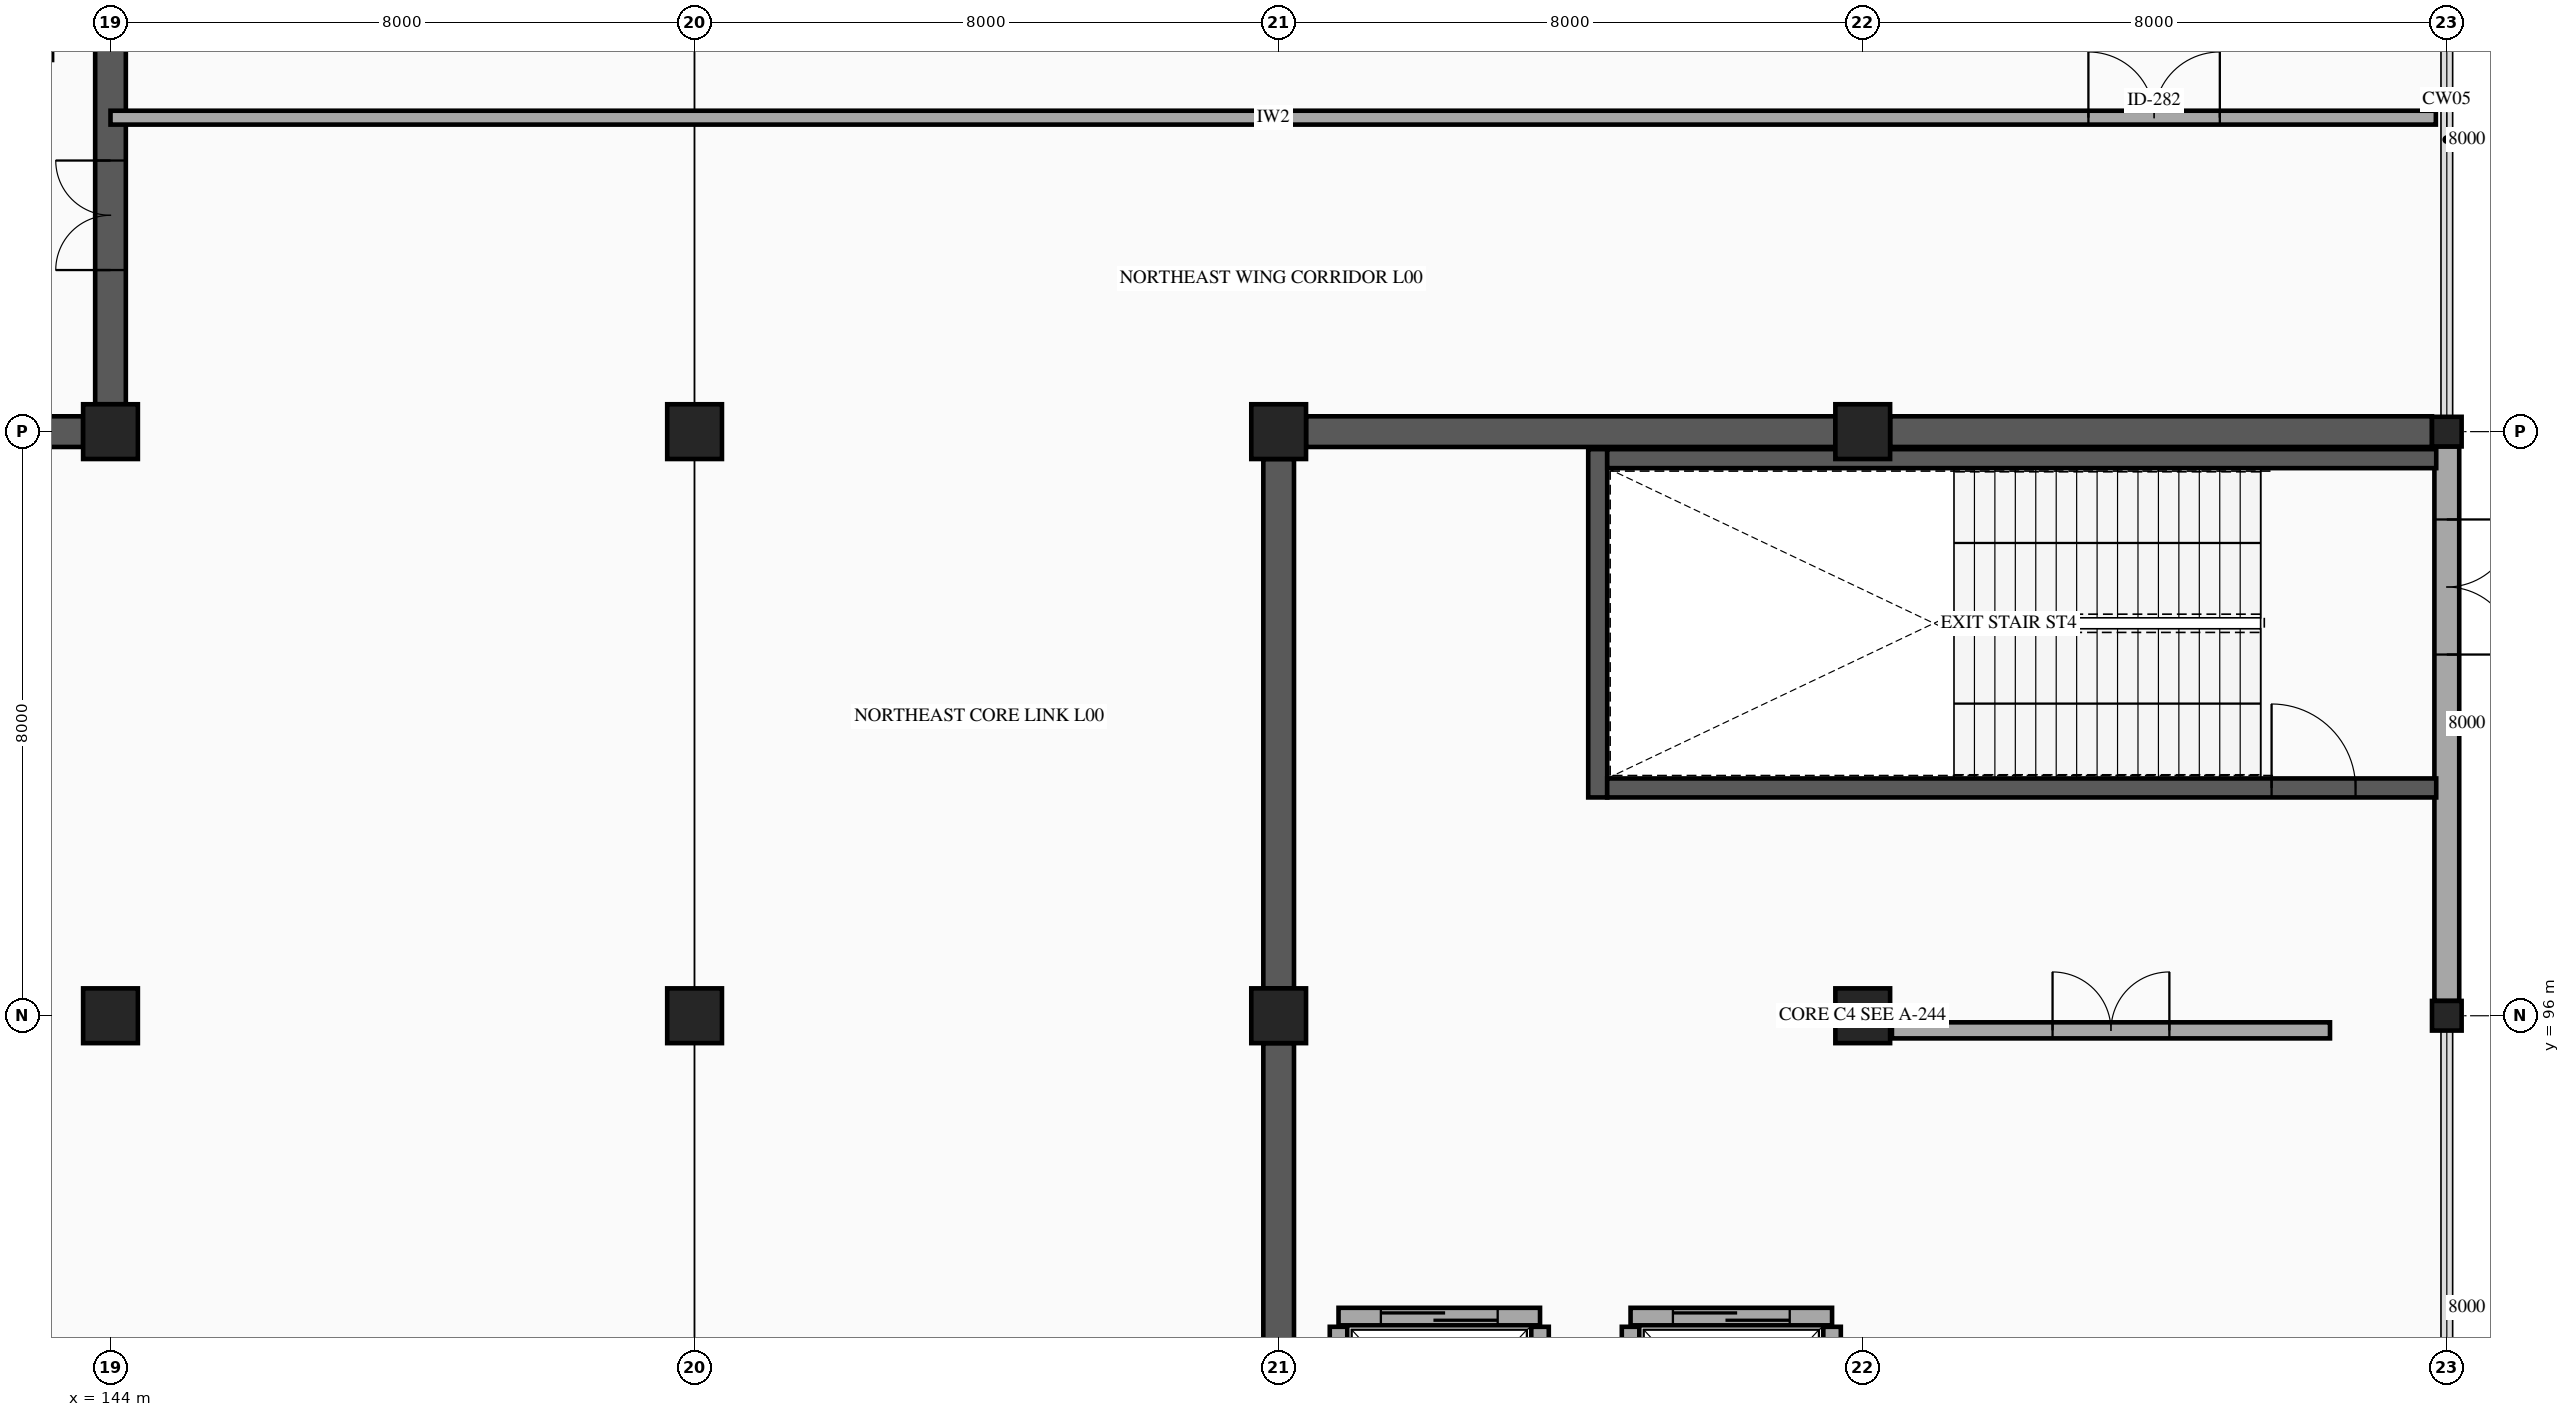
"""IFC4 building model, lengths in metres.
Left out: names, types, materials, properties, quantities, classifications, styles, units other than length and angle.
Written with IfcOpenShell. Run it as: python <this file> out.ifc"""

import sys

from ifc_helpers import new_model, si_unit, direction, frame, frame_2d, origin, origin_2d, place, context, subcontext, project, spatial, rectangle, hollow_rectangle, extrude, element, fill, save


model = new_model("IFC4")
c1 = context("Model", 3, precision=1e-05, world=origin(), true_north=direction((0.0, 1.0)))
c2 = subcontext(c1, "Body", "Model", "MODEL_VIEW")
j1 = project(units=[si_unit("LENGTHUNIT", "METRE"), si_unit("PLANEANGLEUNIT", "RADIAN")], contexts=[c1])
p1 = place(None, origin())
s1 = spatial("IfcSite", under=j1, at=p1, CompositionType="ELEMENT")
p2 = place(p1, origin())
s2 = spatial("IfcBuilding", under=s1, at=p2, CompositionType="ELEMENT")
p3 = place(p2, origin())
s3 = spatial("IfcBuildingStorey", under=s2, at=p3, CompositionType="ELEMENT", Elevation=0.0)
for number, where, z_axis, x_axis in (
    (1, (144.0, 96.0, 0.0), (0.0, 0.0, 1.0), (1.0, 0.0, 0.0)),
    (2, (144.0, 104.0, 0.0), (0.0, 0.0, 1.0), (1.0, 0.0, 0.0)),
    (3, (152.0, 96.0, 0.0), (0.0, 0.0, 1.0), (1.0, 0.0, 0.0)),
    (4, (152.0, 104.0, 0.0), (0.0, 0.0, 1.0), (1.0, 0.0, 0.0)),
    (5, (160.0, 96.0, 0.0), (0.0, 0.0, 1.0), (1.0, 0.0, 0.0)),
    (6, (160.0, 104.0, 0.0), (0.0, 0.0, 1.0), (1.0, 0.0, 0.0)),
    (7, (168.0, 96.0, 0.0), (0.0, 0.0, 1.0), (1.0, 0.0, 0.0)),
    (8, (168.0, 104.0, 0.0), (0.0, 0.0, 1.0), (1.0, 0.0, 0.0)),
):
    element("IfcColumn", number, at=place(p3, frame(where, z_axis=z_axis, x_axis=x_axis)), inside=s3, PredefinedType="COLUMN", context=c2, shape_type="SweptSolid", body=[
        extrude(rectangle(XDim=0.75, YDim=0.75, at=origin_2d()), origin(), (0.0, 0.0, 1.0), 5.6),
    ])
for number, where, z_axis, x_axis in (
    (9, (176.0, 96.0, 0.0), (0.0, 0.0, 1.0), (1.0, 0.0, 0.0)),
    (10, (176.0, 104.0, 0.0), (0.0, 0.0, 1.0), (1.0, 0.0, 0.0)),
):
    element("IfcColumn", number, at=place(p3, frame(where, z_axis=z_axis, x_axis=x_axis)), inside=s3, PredefinedType="COLUMN", context=c2, shape_type="SweptSolid", body=[
        extrude(hollow_rectangle(XDim=0.406, YDim=0.406, WallThickness=0.015, InnerFilletRadius=0.015, OuterFilletRadius=0.029, at=origin_2d()), origin(), (0.0, 0.0, 1.0), 5.6),
    ])
p4 = place(p3, frame((176.0, 103.797, 0.0), z_axis=(0.0, 0.0, 1.0), x_axis=(0.0, -1.0, 0.0)))
e11 = element("IfcWall", 11, at=p4, inside=s3, PredefinedType="STANDARD", context=c2, shape_type="SweptSolid", body=[
    extrude(rectangle(XDim=7.594, YDim=0.34, at=frame_2d((3.797, 0.0))), origin(), (0.0, 0.0, 1.0), 4.58),
])
p5 = place(p4, frame((1.0, 0.0, 0.0)))
e12 = element("IfcOpeningElement", 12, at=p5, cuts=e11, PredefinedType="OPENING", context=c2, shape_type="SweptSolid", body=[
    extrude(rectangle(XDim=1.85, YDim=2.2, at=frame_2d((0.925, 1.1))), frame((0.0, 0.18, 0.0), z_axis=(0.0, -1.0, 0.0), x_axis=(1.0, 0.0, 0.0)), (0.0, 0.0, 1.0), 0.36),
])
p6 = place(p3, frame((136.375, 104.0, 0.0), z_axis=(0.0, 0.0, 1.0), x_axis=(1.0, 0.0, 0.0)))
e13 = element("IfcWall", 13, at=p6, inside=s3, PredefinedType="SHEAR", context=c2, shape_type="SweptSolid", body=[
    extrude(rectangle(XDim=7.25, YDim=0.42, at=frame_2d((3.625, 0.0))), origin(), (0.0, 0.0, 1.0), 5.38),
])
p7 = place(p6, frame((2.875, 0.0, 0.0)))
e14 = element("IfcOpeningElement", 14, at=p7, cuts=e13, PredefinedType="OPENING", context=c2, shape_type="SweptSolid", body=[
    extrude(rectangle(XDim=1.5, YDim=2.15, at=frame_2d((0.75, 1.075))), frame((0.0, 0.22, 0.0), z_axis=(0.0, -1.0, 0.0), x_axis=(1.0, 0.0, 0.0)), (0.0, 0.0, 1.0), 0.44),
])
p8 = place(p3, frame((144.0, 104.375, 0.0), z_axis=(0.0, 0.0, 1.0), x_axis=(0.0, 1.0, 0.0)))
e15 = element("IfcWall", 15, at=p8, inside=s3, PredefinedType="SHEAR", context=c2, shape_type="SweptSolid", body=[
    extrude(rectangle(XDim=7.25, YDim=0.42, at=frame_2d((3.625, 0.0))), origin(), (0.0, 0.0, 1.0), 5.38),
])
p9 = place(p8, frame((1.838, 0.0, 0.0)))
e16 = element("IfcOpeningElement", 16, at=p9, cuts=e15, PredefinedType="OPENING", context=c2, shape_type="SweptSolid", body=[
    extrude(rectangle(XDim=1.5, YDim=2.15, at=frame_2d((0.75, 1.075))), frame((0.0, 0.22, 0.0), z_axis=(0.0, -1.0, 0.0), x_axis=(1.0, 0.0, 0.0)), (0.0, 0.0, 1.0), 0.44),
])
p10 = place(p3, frame((164.37, 98.99, 0.0), z_axis=(0.0, 0.0, 1.0), x_axis=(0.0, 1.0, 0.0)))
e17 = element("IfcWall", 17, at=p10, inside=s3, PredefinedType="SHEAR", context=c2, shape_type="SweptSolid", body=[
    extrude(rectangle(XDim=4.77, YDim=0.26, at=frame_2d((2.385, 0.0))), origin(), (0.0, 0.0, 1.0), 5.38),
])
p11 = place(p3, frame((164.5, 99.12, 0.0), z_axis=(0.0, 0.0, 1.0), x_axis=(1.0, 0.0, 0.0)))
e18 = element("IfcWall", 18, at=p11, inside=s3, PredefinedType="SHEAR", context=c2, shape_type="SweptSolid", body=[
    extrude(rectangle(XDim=11.355, YDim=0.26, at=frame_2d((5.677, 0.0))), origin(), (0.0, 0.0, 1.0), 5.38),
])
p12 = place(p11, frame((9.1, 0.0, 0.0)))
e19 = element("IfcOpeningElement", 19, at=p12, cuts=e18, PredefinedType="OPENING", context=c2, shape_type="SweptSolid", body=[
    extrude(rectangle(XDim=1.15, YDim=2.15, at=frame_2d((0.575, 1.075))), frame((0.0, 0.14, 0.0), z_axis=(0.0, -1.0, 0.0), x_axis=(1.0, 0.0, 0.0)), (0.0, 0.0, 1.0), 0.28),
])
p13 = place(p3, frame((164.5, 103.63, 0.0), z_axis=(0.0, 0.0, 1.0), x_axis=(1.0, 0.0, 0.0)))
e20 = element("IfcWall", 20, at=p13, inside=s3, PredefinedType="SHEAR", context=c2, shape_type="SweptSolid", body=[
    extrude(rectangle(XDim=11.355, YDim=0.26, at=frame_2d((5.677, 0.0))), origin(), (0.0, 0.0, 1.0), 5.38),
])
p14 = place(p3, frame((160.375, 104.0, 0.0), z_axis=(0.0, 0.0, 1.0), x_axis=(1.0, 0.0, 0.0)))
e21 = element("IfcWall", 21, at=p14, inside=s3, PredefinedType="SHEAR", context=c2, shape_type="SweptSolid", body=[
    extrude(rectangle(XDim=7.25, YDim=0.42, at=frame_2d((3.625, 0.0))), origin(), (0.0, 0.0, 1.0), 5.38),
])
p15 = place(p3, frame((168.375, 104.0, 0.0), z_axis=(0.0, 0.0, 1.0), x_axis=(1.0, 0.0, 0.0)))
e22 = element("IfcWall", 22, at=p15, inside=s3, PredefinedType="SHEAR", context=c2, shape_type="SweptSolid", body=[
    extrude(rectangle(XDim=7.422, YDim=0.42, at=frame_2d((3.711, 0.0))), origin(), (0.0, 0.0, 1.0), 5.38),
])
for number, where, z_axis, x_axis in (
    (23, (160.0, 88.375, 0.0), (0.0, 0.0, 1.0), (0.0, 1.0, 0.0)),
    (24, (160.0, 96.375, 0.0), (0.0, 0.0, 1.0), (0.0, 1.0, 0.0)),
):
    element("IfcWall", number, at=place(p3, frame(where, z_axis=z_axis, x_axis=x_axis)), inside=s3, PredefinedType="SHEAR", context=c2, shape_type="SweptSolid", body=[
        extrude(rectangle(XDim=7.25, YDim=0.42, at=frame_2d((3.625, 0.0))), origin(), (0.0, 0.0, 1.0), 5.38),
    ])
p16 = place(p3, frame((164.82, 91.88, 0.0), z_axis=(0.0, 0.0, 1.0), x_axis=(1.0, 0.0, 0.0)))
e25 = element("IfcWall", 25, at=p16, inside=s3, PredefinedType="PARTITIONING", context=c2, shape_type="SweptSolid", body=[
    extrude(rectangle(XDim=2.76, YDim=0.24, at=frame_2d((1.38, 0.0))), origin(), (0.0, 0.0, 1.0), 5.38),
])
p17 = place(p16, frame((0.58, 0.0, 0.0)))
e26 = element("IfcOpeningElement", 26, at=p17, cuts=e25, PredefinedType="OPENING", context=c2, shape_type="SweptSolid", body=[
    extrude(rectangle(XDim=1.6, YDim=2.3, at=frame_2d((0.8, 1.15))), frame((0.0, 0.13, 0.0), z_axis=(0.0, -1.0, 0.0), x_axis=(1.0, 0.0, 0.0)), (0.0, 0.0, 1.0), 0.26),
])
for number, where, z_axis, x_axis in (
    (27, (164.82, 89.06, 0.0), (0.0, 0.0, 1.0), (0.0, 1.0, 0.0)),
    (28, (167.58, 89.06, 0.0), (0.0, 0.0, 1.0), (0.0, 1.0, 0.0)),
):
    element("IfcWall", number, at=place(p3, frame(where, z_axis=z_axis, x_axis=x_axis)), inside=s3, PredefinedType="PARTITIONING", context=c2, shape_type="SweptSolid", body=[
        extrude(rectangle(XDim=2.68, YDim=0.24, at=frame_2d((1.34, 0.0))), origin(), (0.0, 0.0, 1.0), 5.38),
    ])
p18 = place(p3, frame((160.82, 91.88, 0.0), z_axis=(0.0, 0.0, 1.0), x_axis=(1.0, 0.0, 0.0)))
e29 = element("IfcWall", 29, at=p18, inside=s3, PredefinedType="PARTITIONING", context=c2, shape_type="SweptSolid", body=[
    extrude(rectangle(XDim=2.76, YDim=0.24, at=frame_2d((1.38, 0.0))), origin(), (0.0, 0.0, 1.0), 5.38),
])
p19 = place(p18, frame((0.58, 0.0, 0.0)))
e30 = element("IfcOpeningElement", 30, at=p19, cuts=e29, PredefinedType="OPENING", context=c2, shape_type="SweptSolid", body=[
    extrude(rectangle(XDim=1.6, YDim=2.3, at=frame_2d((0.8, 1.15))), frame((0.0, 0.13, 0.0), z_axis=(0.0, -1.0, 0.0), x_axis=(1.0, 0.0, 0.0)), (0.0, 0.0, 1.0), 0.26),
])
for number, where, z_axis, x_axis in (
    (31, (160.82, 89.06, 0.0), (0.0, 0.0, 1.0), (0.0, 1.0, 0.0)),
    (32, (163.58, 89.06, 0.0), (0.0, 0.0, 1.0), (0.0, 1.0, 0.0)),
):
    element("IfcWall", number, at=place(p3, frame(where, z_axis=z_axis, x_axis=x_axis)), inside=s3, PredefinedType="PARTITIONING", context=c2, shape_type="SweptSolid", body=[
        extrude(rectangle(XDim=2.68, YDim=0.24, at=frame_2d((1.34, 0.0))), origin(), (0.0, 0.0, 1.0), 5.38),
    ])
p20 = place(p3, frame((168.4, 95.8, 0.0), z_axis=(0.0, 0.0, 1.0), x_axis=(1.0, 0.0, 0.0)))
e33 = element("IfcWall", 33, at=p20, inside=s3, PredefinedType="PARTITIONING", context=c2, shape_type="SweptSolid", body=[
    extrude(rectangle(XDim=6.0, YDim=0.22, at=frame_2d((3.0, 0.0))), origin(), (0.0, 0.0, 1.0), 4.58),
])
p21 = place(p20, frame((2.2, 0.0, 0.0)))
e34 = element("IfcOpeningElement", 34, at=p21, cuts=e33, PredefinedType="OPENING", context=c2, shape_type="SweptSolid", body=[
    extrude(rectangle(XDim=1.6, YDim=2.15, at=frame_2d((0.8, 1.075))), frame((0.0, 0.12, 0.0), z_axis=(0.0, -1.0, 0.0), x_axis=(1.0, 0.0, 0.0)), (0.0, 0.0, 1.0), 0.24),
])
p22 = place(p3, frame((144.0, 108.3, 0.0), z_axis=(0.0, 0.0, 1.0), x_axis=(1.0, 0.0, 0.0)))
e35 = element("IfcWall", 35, at=p22, inside=s3, PredefinedType="PARTITIONING", context=c2, shape_type="SweptSolid", body=[
    extrude(rectangle(XDim=31.85, YDim=0.19, at=frame_2d((15.925, 0.0))), origin(), (0.0, 0.0, 1.0), 4.58),
])
p23 = place(p22, frame((27.091, 0.0, 0.0)))
e36 = element("IfcOpeningElement", 36, at=p23, cuts=e35, PredefinedType="OPENING", context=c2, shape_type="SweptSolid", body=[
    extrude(rectangle(XDim=1.8, YDim=2.25, at=frame_2d((0.9, 1.125))), frame((0.0, 0.105, 0.0), z_axis=(0.0, -1.0, 0.0), x_axis=(1.0, 0.0, 0.0)), (0.0, 0.0, 1.0), 0.21),
])
p24 = place(p5, origin())
e37 = element("IfcDoor", 37, at=p24, inside=s3, OperationType="DOUBLE_DOOR_SINGLE_SWING", PredefinedType="DOOR", context=c2, shape_type="SweptSolid", body=[
    extrude(rectangle(XDim=1.85, YDim=2.2, at=frame_2d((0.925, 1.1))), frame((0.0, 0.025, 0.0), z_axis=(0.0, -1.0, 0.0), x_axis=(1.0, 0.0, 0.0)), (0.0, 0.0, 1.0), 0.05),
])
fill(e12, e37)
p25 = place(p9, origin())
e38 = element("IfcDoor", 38, at=p25, inside=s3, OperationType="DOUBLE_DOOR_SINGLE_SWING", PredefinedType="DOOR", context=c2, shape_type="SweptSolid", body=[
    extrude(rectangle(XDim=1.5, YDim=2.15, at=frame_2d((0.75, 1.075))), frame((0.0, 0.025, 0.0), z_axis=(0.0, -1.0, 0.0), x_axis=(1.0, 0.0, 0.0)), (0.0, 0.0, 1.0), 0.05),
])
fill(e16, e38)
p26 = place(p12, origin())
e39 = element("IfcDoor", 39, at=p26, inside=s3, OperationType="SINGLE_SWING_LEFT", PredefinedType="DOOR", context=c2, shape_type="SweptSolid", body=[
    extrude(rectangle(XDim=1.15, YDim=2.15, at=frame_2d((0.575, 1.075))), frame((0.0, 0.025, 0.0), z_axis=(0.0, -1.0, 0.0), x_axis=(1.0, 0.0, 0.0)), (0.0, 0.0, 1.0), 0.05),
])
fill(e19, e39)
p27 = place(p17, origin())
e40 = element("IfcDoor", 40, at=p27, inside=s3, OperationType="SLIDING_TO_LEFT", PredefinedType="DOOR", context=c2, shape_type="SweptSolid", body=[
    extrude(rectangle(XDim=1.6, YDim=2.3, at=frame_2d((0.8, 1.15))), frame((0.0, 0.025, 0.0), z_axis=(0.0, -1.0, 0.0), x_axis=(1.0, 0.0, 0.0)), (0.0, 0.0, 1.0), 0.05),
])
fill(e26, e40)
p28 = place(p19, origin())
e41 = element("IfcDoor", 41, at=p28, inside=s3, OperationType="SLIDING_TO_LEFT", PredefinedType="DOOR", context=c2, shape_type="SweptSolid", body=[
    extrude(rectangle(XDim=1.6, YDim=2.3, at=frame_2d((0.8, 1.15))), frame((0.0, 0.025, 0.0), z_axis=(0.0, -1.0, 0.0), x_axis=(1.0, 0.0, 0.0)), (0.0, 0.0, 1.0), 0.05),
])
fill(e30, e41)
p29 = place(p21, origin())
e42 = element("IfcDoor", 42, at=p29, inside=s3, OperationType="DOUBLE_DOOR_SINGLE_SWING", PredefinedType="DOOR", context=c2, shape_type="SweptSolid", body=[
    extrude(rectangle(XDim=1.6, YDim=2.15, at=frame_2d((0.8, 1.075))), frame((0.0, 0.025, 0.0), z_axis=(0.0, -1.0, 0.0), x_axis=(1.0, 0.0, 0.0)), (0.0, 0.0, 1.0), 0.05),
])
fill(e34, e42)
p30 = place(p23, origin())
e43 = element("IfcDoor", 43, at=p30, inside=s3, OperationType="DOUBLE_DOOR_SINGLE_SWING", PredefinedType="DOOR", context=c2, shape_type="SweptSolid", body=[
    extrude(rectangle(XDim=1.8, YDim=2.25, at=frame_2d((0.9, 1.125))), frame((0.0, 0.025, 0.0), z_axis=(0.0, -1.0, 0.0), x_axis=(1.0, 0.0, 0.0)), (0.0, 0.0, 1.0), 0.05),
])
fill(e36, e43)
save(model, sys.argv[1])
